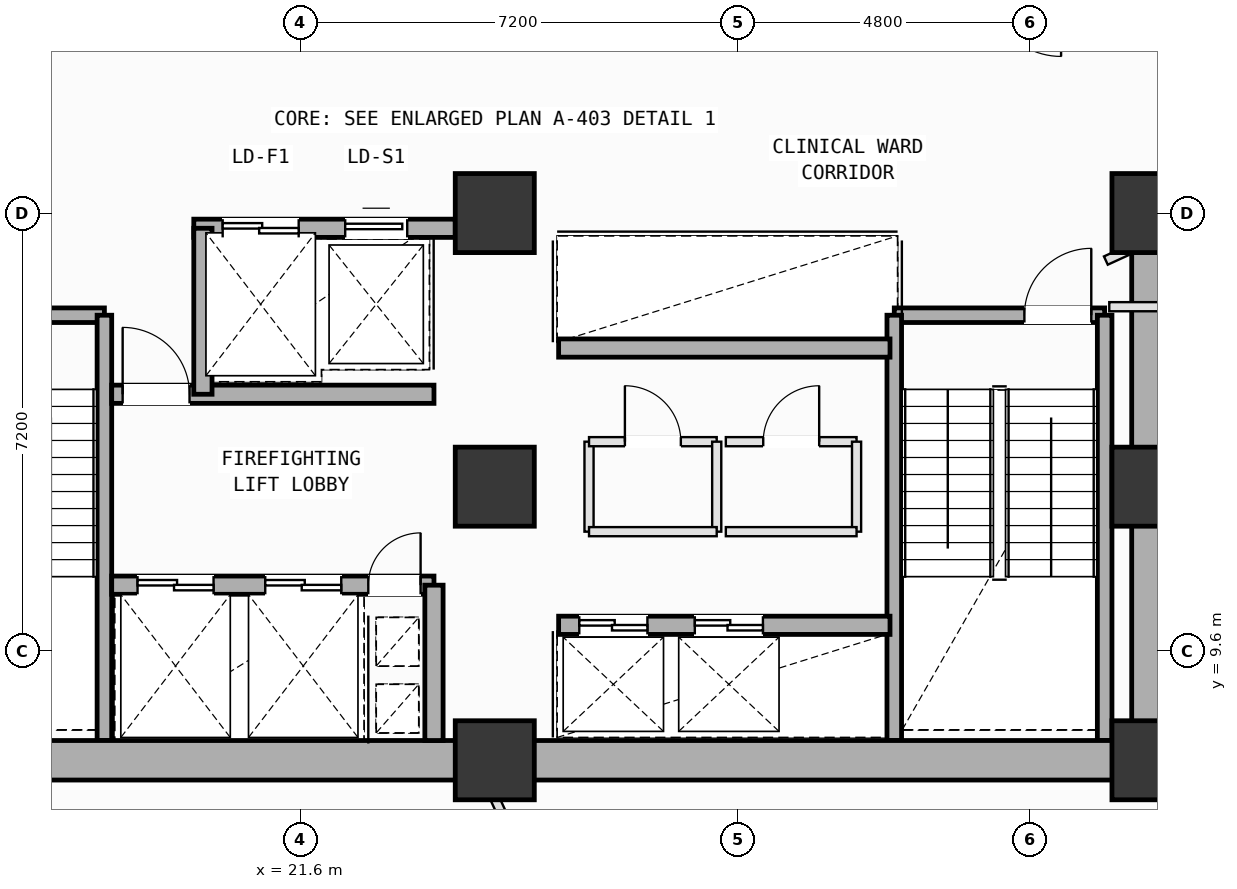
"""IFC4 building model, lengths in metres.
Left out: names, types, materials, properties, quantities, classifications, styles, units other than length and angle.
Written with IfcOpenShell. Run it as: python <this file> out.ifc"""

import sys

from ifc_helpers import new_model, si_unit, direction, frame, frame_2d, origin, origin_2d, place, context, subcontext, project, spatial, rectangle, extrude, element, fill, save


model = new_model("IFC4")
c1 = context("Model", 3, precision=1e-05, world=origin(), true_north=direction((0.0, 1.0)))
c2 = subcontext(c1, "Body", "Model", "MODEL_VIEW")
j1 = project(units=[si_unit("LENGTHUNIT", "METRE"), si_unit("PLANEANGLEUNIT", "RADIAN")], contexts=[c1])
p1 = place(None, origin())
s1 = spatial("IfcSite", under=j1, at=p1, CompositionType="ELEMENT")
p2 = place(p1, origin())
s2 = spatial("IfcBuilding", under=s1, at=p2, CompositionType="ELEMENT")
p3 = place(p2, frame((0.0, 0.0, 128.4)))
s3 = spatial("IfcBuildingStorey", under=s2, at=p3, CompositionType="ELEMENT", Elevation=128.4)
for number, where, z_axis, x_axis in (
    (1, (24.8, 7.8, 0.0), (0.0, 0.0, 1.0), (1.0, 0.0, 0.0)),
    (2, (24.8, 12.3, 0.0), (0.0, 0.0, 1.0), (1.0, 0.0, 0.0)),
    (3, (24.8, 16.8, 0.0), (0.0, 0.0, 1.0), (1.0, 0.0, 0.0)),
    (4, (35.6, 7.8, 0.0), (0.0, 0.0, 1.0), (1.0, 0.0, 0.0)),
    (5, (35.6, 12.3, 0.0), (0.0, 0.0, 1.0), (1.0, 0.0, 0.0)),
    (6, (35.6, 16.8, 0.0), (0.0, 0.0, 1.0), (1.0, 0.0, 0.0)),
):
    element("IfcColumn", number, at=place(p3, frame(where, z_axis=z_axis, x_axis=x_axis)), inside=s3, PredefinedType="COLUMN", context=c2, shape_type="SweptSolid", body=[
        extrude(rectangle(XDim=1.3, YDim=1.3, at=origin_2d()), origin(), (0.0, 0.0, 1.0), 4.0),
    ])
p4 = place(p3, frame((14.92, 15.12, 0.0), z_axis=(0.0, 0.0, 1.0), x_axis=(1.0, 0.0, 0.0)))
e7 = element("IfcWall", 7, at=p4, inside=s3, PredefinedType="SOLIDWALL", context=c2, shape_type="SweptSolid", body=[
    extrude(rectangle(XDim=3.46, YDim=0.24, at=frame_2d((1.73, 0.0))), origin(), (0.0, 0.0, 1.0), 3.78),
])
p5 = place(p4, frame((0.22, 0.0, 0.0)))
e8 = element("IfcOpeningElement", 8, at=p5, cuts=e7, PredefinedType="OPENING", context=c2, shape_type="SweptSolid", body=[
    extrude(rectangle(XDim=1.1, YDim=2.15, at=frame_2d((0.55, 1.075))), frame((0.0, 0.13, 0.0), z_axis=(0.0, -1.0, 0.0), x_axis=(1.0, 0.0, 0.0)), (0.0, 0.0, 1.0), 0.26),
])
p6 = place(p3, frame((18.38, 15.12, 0.0), z_axis=(0.0, 0.0, 1.0), x_axis=(0.0, -1.0, 0.0)))
e9 = element("IfcWall", 9, at=p6, inside=s3, PredefinedType="SOLIDWALL", context=c2, shape_type="SweptSolid", body=[
    extrude(rectangle(XDim=6.995, YDim=0.24, at=frame_2d((3.498, 0.0))), origin(), (0.0, 0.0, 1.0), 3.78),
])
p7 = place(p3, frame((31.37, 15.12, 0.0), z_axis=(0.0, 0.0, 1.0), x_axis=(1.0, 0.0, 0.0)))
e10 = element("IfcWall", 10, at=p7, inside=s3, PredefinedType="SOLIDWALL", context=c2, shape_type="SweptSolid", body=[
    extrude(rectangle(XDim=3.46, YDim=0.24, at=frame_2d((1.73, 0.0))), origin(), (0.0, 0.0, 1.0), 3.78),
])
p8 = place(p7, frame((2.14, 0.0, 0.0)))
e11 = element("IfcOpeningElement", 11, at=p8, cuts=e10, PredefinedType="OPENING", context=c2, shape_type="SweptSolid", body=[
    extrude(rectangle(XDim=1.1, YDim=2.15, at=frame_2d((0.55, 1.075))), frame((0.0, 0.13, 0.0), z_axis=(0.0, -1.0, 0.0), x_axis=(1.0, 0.0, 0.0)), (0.0, 0.0, 1.0), 0.26),
])
for number, where, z_axis, x_axis in (
    (12, (34.83, 15.12, 0.0), (0.0, 0.0, 1.0), (0.0, -1.0, 0.0)),
    (13, (31.37, 8.125, 0.0), (0.0, 0.0, 1.0), (0.0, 1.0, 0.0)),
):
    element("IfcWall", number, at=place(p3, frame(where, z_axis=z_axis, x_axis=x_axis)), inside=s3, PredefinedType="SOLIDWALL", context=c2, shape_type="SweptSolid", body=[
        extrude(rectangle(XDim=6.995, YDim=0.24, at=frame_2d((3.498, 0.0))), origin(), (0.0, 0.0, 1.0), 3.78),
    ])
for number, where, z_axis, x_axis in (
    (14, (14.0, 7.8, 0.0), (0.0, 0.0, 1.0), (1.0, 0.0, 0.0)),
    (15, (24.8, 7.8, 0.0), (0.0, 0.0, 1.0), (1.0, 0.0, 0.0)),
):
    element("IfcWall", number, at=place(p3, frame(where, z_axis=z_axis, x_axis=x_axis)), inside=s3, PredefinedType="SHEAR", context=c2, shape_type="SweptSolid", body=[
        extrude(rectangle(XDim=10.8, YDim=0.65, at=frame_2d((5.4, 0.0))), origin(), (0.0, 0.0, 1.0), 3.78),
    ])
p9 = place(p3, frame((35.6, 7.8, 0.0), z_axis=(0.0, 0.0, 1.0), x_axis=(0.0, 1.0, 0.0)))
e16 = element("IfcWall", 16, at=p9, inside=s3, PredefinedType="SHEAR", context=c2, shape_type="SweptSolid", body=[
    extrude(rectangle(XDim=9.0, YDim=0.65, at=frame_2d((4.5, 0.0))), origin(), (0.0, 0.0, 1.0), 3.78),
])
p10 = place(p3, frame((19.85, 16.55, 0.0), z_axis=(0.0, 0.0, 1.0), x_axis=(1.0, 0.0, 0.0)))
e17 = element("IfcWall", 17, at=p10, inside=s3, PredefinedType="SOLIDWALL", context=c2, shape_type="SweptSolid", body=[
    extrude(rectangle(XDim=4.3, YDim=0.3, at=frame_2d((2.15, 0.0))), origin(), (0.0, 0.0, 1.0), 3.78),
])
p11 = place(p10, frame((0.475, 0.0, 0.0)))
e18 = element("IfcOpeningElement", 18, at=p11, cuts=e17, PredefinedType="OPENING", context=c2, shape_type="SweptSolid", body=[
    extrude(rectangle(XDim=1.25, YDim=2.18, at=frame_2d((0.625, 1.09))), frame((0.0, 0.16, 0.0), z_axis=(0.0, -1.0, 0.0), x_axis=(1.0, 0.0, 0.0)), (0.0, 0.0, 1.0), 0.32),
])
p12 = place(p10, frame((2.49, 0.0, 0.0)))
e19 = element("IfcOpeningElement", 19, at=p12, cuts=e17, PredefinedType="OPENING", context=c2, shape_type="SweptSolid", body=[
    extrude(rectangle(XDim=1.02, YDim=2.12, at=frame_2d((0.51, 1.06))), frame((0.0, 0.16, 0.0), z_axis=(0.0, -1.0, 0.0), x_axis=(1.0, 0.0, 0.0)), (0.0, 0.0, 1.0), 0.32),
])
p13 = place(p3, frame((18.5, 10.68, 0.0), z_axis=(0.0, 0.0, 1.0), x_axis=(1.0, 0.0, 0.0)))
e20 = element("IfcWall", 20, at=p13, inside=s3, PredefinedType="SOLIDWALL", context=c2, shape_type="SweptSolid", body=[
    extrude(rectangle(XDim=5.3, YDim=0.3, at=frame_2d((2.65, 0.0))), origin(), (0.0, 0.0, 1.0), 3.78),
])
p14 = place(p13, frame((4.22, 0.0, 0.0)))
e21 = element("IfcOpeningElement", 21, at=p14, cuts=e20, PredefinedType="OPENING", context=c2, shape_type="SweptSolid", body=[
    extrude(rectangle(XDim=0.86, YDim=2.06, at=frame_2d((0.43, 1.03))), frame((0.0, 0.16, 0.0), z_axis=(0.0, -1.0, 0.0), x_axis=(1.0, 0.0, 0.0)), (0.0, 0.0, 1.0), 0.32),
])
p15 = place(p13, frame((0.425, 0.0, 0.0)))
e22 = element("IfcOpeningElement", 22, at=p15, cuts=e20, PredefinedType="OPENING", context=c2, shape_type="SweptSolid", body=[
    extrude(rectangle(XDim=1.25, YDim=2.18, at=frame_2d((0.625, 1.09))), frame((0.0, 0.16, 0.0), z_axis=(0.0, -1.0, 0.0), x_axis=(1.0, 0.0, 0.0)), (0.0, 0.0, 1.0), 0.32),
])
p16 = place(p13, frame((2.525, 0.0, 0.0)))
e23 = element("IfcOpeningElement", 23, at=p16, cuts=e20, PredefinedType="OPENING", context=c2, shape_type="SweptSolid", body=[
    extrude(rectangle(XDim=1.25, YDim=2.18, at=frame_2d((0.625, 1.09))), frame((0.0, 0.16, 0.0), z_axis=(0.0, -1.0, 0.0), x_axis=(1.0, 0.0, 0.0)), (0.0, 0.0, 1.0), 0.32),
])
p17 = place(p3, frame((18.5, 13.82, 0.0), z_axis=(0.0, 0.0, 1.0), x_axis=(1.0, 0.0, 0.0)))
e24 = element("IfcWall", 24, at=p17, inside=s3, PredefinedType="SOLIDWALL", context=c2, shape_type="SweptSolid", body=[
    extrude(rectangle(XDim=5.3, YDim=0.3, at=frame_2d((2.65, 0.0))), origin(), (0.0, 0.0, 1.0), 3.78),
])
p18 = place(p17, frame((0.18, 0.0, 0.0)))
e25 = element("IfcOpeningElement", 25, at=p18, cuts=e24, PredefinedType="OPENING", context=c2, shape_type="SweptSolid", body=[
    extrude(rectangle(XDim=1.1, YDim=2.15, at=frame_2d((0.55, 1.075))), frame((0.0, 0.16, 0.0), z_axis=(0.0, -1.0, 0.0), x_axis=(1.0, 0.0, 0.0)), (0.0, 0.0, 1.0), 0.32),
])
p19 = place(p3, frame((23.8, 8.125, 0.0), z_axis=(0.0, 0.0, 1.0), x_axis=(0.0, 1.0, 0.0)))
e26 = element("IfcWall", 26, at=p19, inside=s3, PredefinedType="SOLIDWALL", context=c2, shape_type="SweptSolid", body=[
    extrude(rectangle(XDim=2.555, YDim=0.3, at=frame_2d((1.277, 0.0))), origin(), (0.0, 0.0, 1.0), 3.78),
])
p20 = place(p3, frame((20.0, 13.82, 0.0), z_axis=(0.0, 0.0, 1.0), x_axis=(0.0, 1.0, 0.0)))
e27 = element("IfcWall", 27, at=p20, inside=s3, PredefinedType="SOLIDWALL", context=c2, shape_type="SweptSolid", body=[
    extrude(rectangle(XDim=2.73, YDim=0.3, at=frame_2d((1.365, 0.0))), origin(), (0.0, 0.0, 1.0), 3.78),
])
p21 = place(p3, frame((25.85, 10.02, 0.0), z_axis=(0.0, 0.0, 1.0), x_axis=(1.0, 0.0, 0.0)))
e28 = element("IfcWall", 28, at=p21, inside=s3, PredefinedType="SOLIDWALL", context=c2, shape_type="SweptSolid", body=[
    extrude(rectangle(XDim=5.45, YDim=0.3, at=frame_2d((2.725, 0.0))), origin(), (0.0, 0.0, 1.0), 3.78),
])
p22 = place(p21, frame((0.34, 0.0, 0.0)))
e29 = element("IfcOpeningElement", 29, at=p22, cuts=e28, PredefinedType="OPENING", context=c2, shape_type="SweptSolid", body=[
    extrude(rectangle(XDim=1.12, YDim=2.15, at=frame_2d((0.56, 1.075))), frame((0.0, 0.16, 0.0), z_axis=(0.0, -1.0, 0.0), x_axis=(1.0, 0.0, 0.0)), (0.0, 0.0, 1.0), 0.32),
])
p23 = place(p21, frame((2.24, 0.0, 0.0)))
e30 = element("IfcOpeningElement", 30, at=p23, cuts=e28, PredefinedType="OPENING", context=c2, shape_type="SweptSolid", body=[
    extrude(rectangle(XDim=1.12, YDim=2.15, at=frame_2d((0.56, 1.075))), frame((0.0, 0.16, 0.0), z_axis=(0.0, -1.0, 0.0), x_axis=(1.0, 0.0, 0.0)), (0.0, 0.0, 1.0), 0.32),
])
p24 = place(p3, frame((25.85, 14.58, 0.0), z_axis=(0.0, 0.0, 1.0), x_axis=(1.0, 0.0, 0.0)))
e31 = element("IfcWall", 31, at=p24, inside=s3, PredefinedType="SOLIDWALL", context=c2, shape_type="SweptSolid", body=[
    extrude(rectangle(XDim=5.45, YDim=0.3, at=frame_2d((2.725, 0.0))), origin(), (0.0, 0.0, 1.0), 3.78),
])
p25 = place(p3, frame((26.35, 11.56, 0.0), z_axis=(0.0, 0.0, 1.0), x_axis=(0.0, 1.0, 0.0)))
e32 = element("IfcWall", 32, at=p25, inside=s3, PredefinedType="PARTITIONING", context=c2, shape_type="SweptSolid", body=[
    extrude(rectangle(XDim=1.48, YDim=0.15, at=frame_2d((0.74, 0.0))), origin(), (0.0, 0.0, 1.0), 3.78),
])
p26 = place(p3, frame((26.35, 13.04, 0.0), z_axis=(0.0, 0.0, 1.0), x_axis=(1.0, 0.0, 0.0)))
e33 = element("IfcWall", 33, at=p26, inside=s3, PredefinedType="PARTITIONING", context=c2, shape_type="SweptSolid", body=[
    extrude(rectangle(XDim=2.1, YDim=0.15, at=frame_2d((1.05, 0.0))), origin(), (0.0, 0.0, 1.0), 3.78),
])
p27 = place(p26, frame((0.59, 0.0, 0.0)))
e34 = element("IfcOpeningElement", 34, at=p27, cuts=e33, PredefinedType="OPENING", context=c2, shape_type="SweptSolid", body=[
    extrude(rectangle(XDim=0.92, YDim=2.1, at=frame_2d((0.46, 1.05))), frame((0.0, 0.085, 0.0), z_axis=(0.0, -1.0, 0.0), x_axis=(1.0, 0.0, 0.0)), (0.0, 0.0, 1.0), 0.17),
])
p28 = place(p3, frame((28.45, 13.04, 0.0), z_axis=(0.0, 0.0, 1.0), x_axis=(0.0, -1.0, 0.0)))
e35 = element("IfcWall", 35, at=p28, inside=s3, PredefinedType="PARTITIONING", context=c2, shape_type="SweptSolid", body=[
    extrude(rectangle(XDim=1.48, YDim=0.15, at=frame_2d((0.74, 0.0))), origin(), (0.0, 0.0, 1.0), 3.78),
])
p29 = place(p3, frame((28.45, 11.56, 0.0), z_axis=(0.0, 0.0, 1.0), x_axis=(-1.0, 0.0, 0.0)))
e36 = element("IfcWall", 36, at=p29, inside=s3, PredefinedType="PARTITIONING", context=c2, shape_type="SweptSolid", body=[
    extrude(rectangle(XDim=2.1, YDim=0.15, at=frame_2d((1.05, 0.0))), origin(), (0.0, 0.0, 1.0), 3.78),
])
p30 = place(p3, frame((28.6, 13.04, 0.0), z_axis=(0.0, 0.0, 1.0), x_axis=(1.0, 0.0, 0.0)))
e37 = element("IfcWall", 37, at=p30, inside=s3, PredefinedType="PARTITIONING", context=c2, shape_type="SweptSolid", body=[
    extrude(rectangle(XDim=2.15, YDim=0.15, at=frame_2d((1.075, 0.0))), origin(), (0.0, 0.0, 1.0), 3.78),
])
p31 = place(p30, frame((0.615, 0.0, 0.0)))
e38 = element("IfcOpeningElement", 38, at=p31, cuts=e37, PredefinedType="OPENING", context=c2, shape_type="SweptSolid", body=[
    extrude(rectangle(XDim=0.92, YDim=2.1, at=frame_2d((0.46, 1.05))), frame((0.0, 0.085, 0.0), z_axis=(0.0, -1.0, 0.0), x_axis=(1.0, 0.0, 0.0)), (0.0, 0.0, 1.0), 0.17),
])
p32 = place(p3, frame((30.75, 13.04, 0.0), z_axis=(0.0, 0.0, 1.0), x_axis=(0.0, -1.0, 0.0)))
e39 = element("IfcWall", 39, at=p32, inside=s3, PredefinedType="PARTITIONING", context=c2, shape_type="SweptSolid", body=[
    extrude(rectangle(XDim=1.48, YDim=0.15, at=frame_2d((0.74, 0.0))), origin(), (0.0, 0.0, 1.0), 3.78),
])
p33 = place(p3, frame((30.75, 11.56, 0.0), z_axis=(0.0, 0.0, 1.0), x_axis=(-1.0, 0.0, 0.0)))
e40 = element("IfcWall", 40, at=p33, inside=s3, PredefinedType="PARTITIONING", context=c2, shape_type="SweptSolid", body=[
    extrude(rectangle(XDim=2.15, YDim=0.15, at=frame_2d((1.075, 0.0))), origin(), (0.0, 0.0, 1.0), 3.78),
])
p34 = place(p3, frame((24.65, 7.5, 0.0), z_axis=(0.0, 0.0, 1.0), x_axis=(0.417865058601, -0.908509104413, 0.0)))
e41 = element("IfcWall", 41, at=p34, inside=s3, PredefinedType="PARTITIONING", context=c2, shape_type="SweptSolid", body=[
    extrude(rectangle(XDim=10.137, YDim=0.15, at=frame_2d((5.069, 0.0))), origin(), (0.0, 0.0, 1.0), 3.78),
])
p35 = place(p34, frame((4.639, 0.0, 0.0)))
e42 = element("IfcOpeningElement", 42, at=p35, cuts=e41, PredefinedType="OPENING", context=c2, shape_type="SweptSolid", body=[
    extrude(rectangle(XDim=0.86, YDim=2.06, at=frame_2d((0.43, 1.03))), frame((0.0, 0.085, 0.0), z_axis=(0.0, -1.0, 0.0), x_axis=(1.0, 0.0, 0.0)), (0.0, 0.0, 1.0), 0.17),
])
p36 = place(p3, frame((35.6, 7.5, 0.0), z_axis=(0.0, 0.0, 1.0), x_axis=(1.0, 0.0, 0.0)))
e43 = element("IfcWall", 43, at=p36, inside=s3, PredefinedType="PARTITIONING", context=c2, shape_type="SweptSolid", body=[
    extrude(rectangle(XDim=0.55, YDim=0.15, at=frame_2d((0.275, 0.0))), origin(), (0.0, 0.0, 1.0), 2.965),
])
p37 = place(p3, frame((34.85, 16.019, 0.0), z_axis=(0.0, 0.0, 1.0), x_axis=(0.908541977425, 0.417793579722, 0.0)))
e44 = element("IfcWall", 44, at=p37, inside=s3, PredefinedType="PARTITIONING", context=c2, shape_type="SweptSolid", body=[
    extrude(rectangle(XDim=1.151, YDim=0.15, at=frame_2d((0.576, 0.0))), origin(), (0.0, 0.0, 1.0), 2.945),
])
p38 = place(p3, frame((36.15, 15.26, 0.0), z_axis=(0.0, 0.0, 1.0), x_axis=(-1.0, 0.0, 0.0)))
e45 = element("IfcWall", 45, at=p38, inside=s3, PredefinedType="PARTITIONING", context=c2, shape_type="SweptSolid", body=[
    extrude(rectangle(XDim=1.244, YDim=0.15, at=frame_2d((0.622, 0.0))), origin(), (0.0, 0.0, 1.0), 3.78),
])
p39 = place(p8, origin())
e46 = element("IfcDoor", 46, at=p39, inside=s3, OperationType="SINGLE_SWING_RIGHT", PredefinedType="DOOR", context=c2, shape_type="SweptSolid", body=[
    extrude(rectangle(XDim=1.1, YDim=2.15, at=frame_2d((0.55, 1.075))), frame((0.0, 0.025, 0.0), z_axis=(0.0, -1.0, 0.0), x_axis=(1.0, 0.0, 0.0)), (0.0, 0.0, 1.0), 0.05),
])
fill(e11, e46)
p40 = place(p14, origin())
e47 = element("IfcDoor", 47, at=p40, inside=s3, OperationType="SINGLE_SWING_RIGHT", PredefinedType="DOOR", context=c2, shape_type="SweptSolid", body=[
    extrude(rectangle(XDim=0.86, YDim=2.06, at=frame_2d((0.43, 1.03))), frame((0.0, 0.025, 0.0), z_axis=(0.0, -1.0, 0.0), x_axis=(1.0, 0.0, 0.0)), (0.0, 0.0, 1.0), 0.05),
])
fill(e21, e47)
p41 = place(p18, origin())
e48 = element("IfcDoor", 48, at=p41, inside=s3, OperationType="SINGLE_SWING_LEFT", PredefinedType="DOOR", context=c2, shape_type="SweptSolid", body=[
    extrude(rectangle(XDim=1.1, YDim=2.15, at=frame_2d((0.55, 1.075))), frame((0.0, 0.025, 0.0), z_axis=(0.0, -1.0, 0.0), x_axis=(1.0, 0.0, 0.0)), (0.0, 0.0, 1.0), 0.05),
])
fill(e25, e48)
p42 = place(p15, origin())
e49 = element("IfcDoor", 49, at=p42, inside=s3, OperationType="DOUBLE_DOOR_SLIDING", PredefinedType="DOOR", context=c2, shape_type="SweptSolid", body=[
    extrude(rectangle(XDim=1.25, YDim=2.18, at=frame_2d((0.625, 1.09))), frame((0.0, 0.025, 0.0), z_axis=(0.0, -1.0, 0.0), x_axis=(1.0, 0.0, 0.0)), (0.0, 0.0, 1.0), 0.05),
])
fill(e22, e49)
p43 = place(p16, origin())
e50 = element("IfcDoor", 50, at=p43, inside=s3, OperationType="DOUBLE_DOOR_SLIDING", PredefinedType="DOOR", context=c2, shape_type="SweptSolid", body=[
    extrude(rectangle(XDim=1.25, YDim=2.18, at=frame_2d((0.625, 1.09))), frame((0.0, 0.025, 0.0), z_axis=(0.0, -1.0, 0.0), x_axis=(1.0, 0.0, 0.0)), (0.0, 0.0, 1.0), 0.05),
])
fill(e23, e50)
p44 = place(p22, origin())
e51 = element("IfcDoor", 51, at=p44, inside=s3, OperationType="DOUBLE_DOOR_SLIDING", PredefinedType="DOOR", context=c2, shape_type="SweptSolid", body=[
    extrude(rectangle(XDim=1.12, YDim=2.15, at=frame_2d((0.56, 1.075))), frame((0.0, 0.025, 0.0), z_axis=(0.0, -1.0, 0.0), x_axis=(1.0, 0.0, 0.0)), (0.0, 0.0, 1.0), 0.05),
])
fill(e29, e51)
p45 = place(p23, origin())
e52 = element("IfcDoor", 52, at=p45, inside=s3, OperationType="DOUBLE_DOOR_SLIDING", PredefinedType="DOOR", context=c2, shape_type="SweptSolid", body=[
    extrude(rectangle(XDim=1.12, YDim=2.15, at=frame_2d((0.56, 1.075))), frame((0.0, 0.025, 0.0), z_axis=(0.0, -1.0, 0.0), x_axis=(1.0, 0.0, 0.0)), (0.0, 0.0, 1.0), 0.05),
])
fill(e30, e52)
p46 = place(p11, origin())
e53 = element("IfcDoor", 53, at=p46, inside=s3, OperationType="DOUBLE_DOOR_SLIDING", PredefinedType="DOOR", context=c2, shape_type="SweptSolid", body=[
    extrude(rectangle(XDim=1.25, YDim=2.18, at=frame_2d((0.625, 1.09))), frame((0.0, 0.025, 0.0), z_axis=(0.0, -1.0, 0.0), x_axis=(1.0, 0.0, 0.0)), (0.0, 0.0, 1.0), 0.05),
])
fill(e18, e53)
p47 = place(p12, origin())
e54 = element("IfcDoor", 54, at=p47, inside=s3, OperationType="SLIDING_TO_LEFT", PredefinedType="DOOR", context=c2, shape_type="SweptSolid", body=[
    extrude(rectangle(XDim=1.02, YDim=2.12, at=frame_2d((0.51, 1.06))), frame((0.0, 0.025, 0.0), z_axis=(0.0, -1.0, 0.0), x_axis=(1.0, 0.0, 0.0)), (0.0, 0.0, 1.0), 0.05),
])
fill(e19, e54)
p48 = place(p27, origin())
e55 = element("IfcDoor", 55, at=p48, inside=s3, OperationType="SINGLE_SWING_LEFT", PredefinedType="DOOR", context=c2, shape_type="SweptSolid", body=[
    extrude(rectangle(XDim=0.92, YDim=2.1, at=frame_2d((0.46, 1.05))), frame((0.0, 0.025, 0.0), z_axis=(0.0, -1.0, 0.0), x_axis=(1.0, 0.0, 0.0)), (0.0, 0.0, 1.0), 0.05),
])
fill(e34, e55)
p49 = place(p31, origin())
e56 = element("IfcDoor", 56, at=p49, inside=s3, OperationType="SINGLE_SWING_RIGHT", PredefinedType="DOOR", context=c2, shape_type="SweptSolid", body=[
    extrude(rectangle(XDim=0.92, YDim=2.1, at=frame_2d((0.46, 1.05))), frame((0.0, 0.025, 0.0), z_axis=(0.0, -1.0, 0.0), x_axis=(1.0, 0.0, 0.0)), (0.0, 0.0, 1.0), 0.05),
])
fill(e38, e56)
save(model, sys.argv[1])
